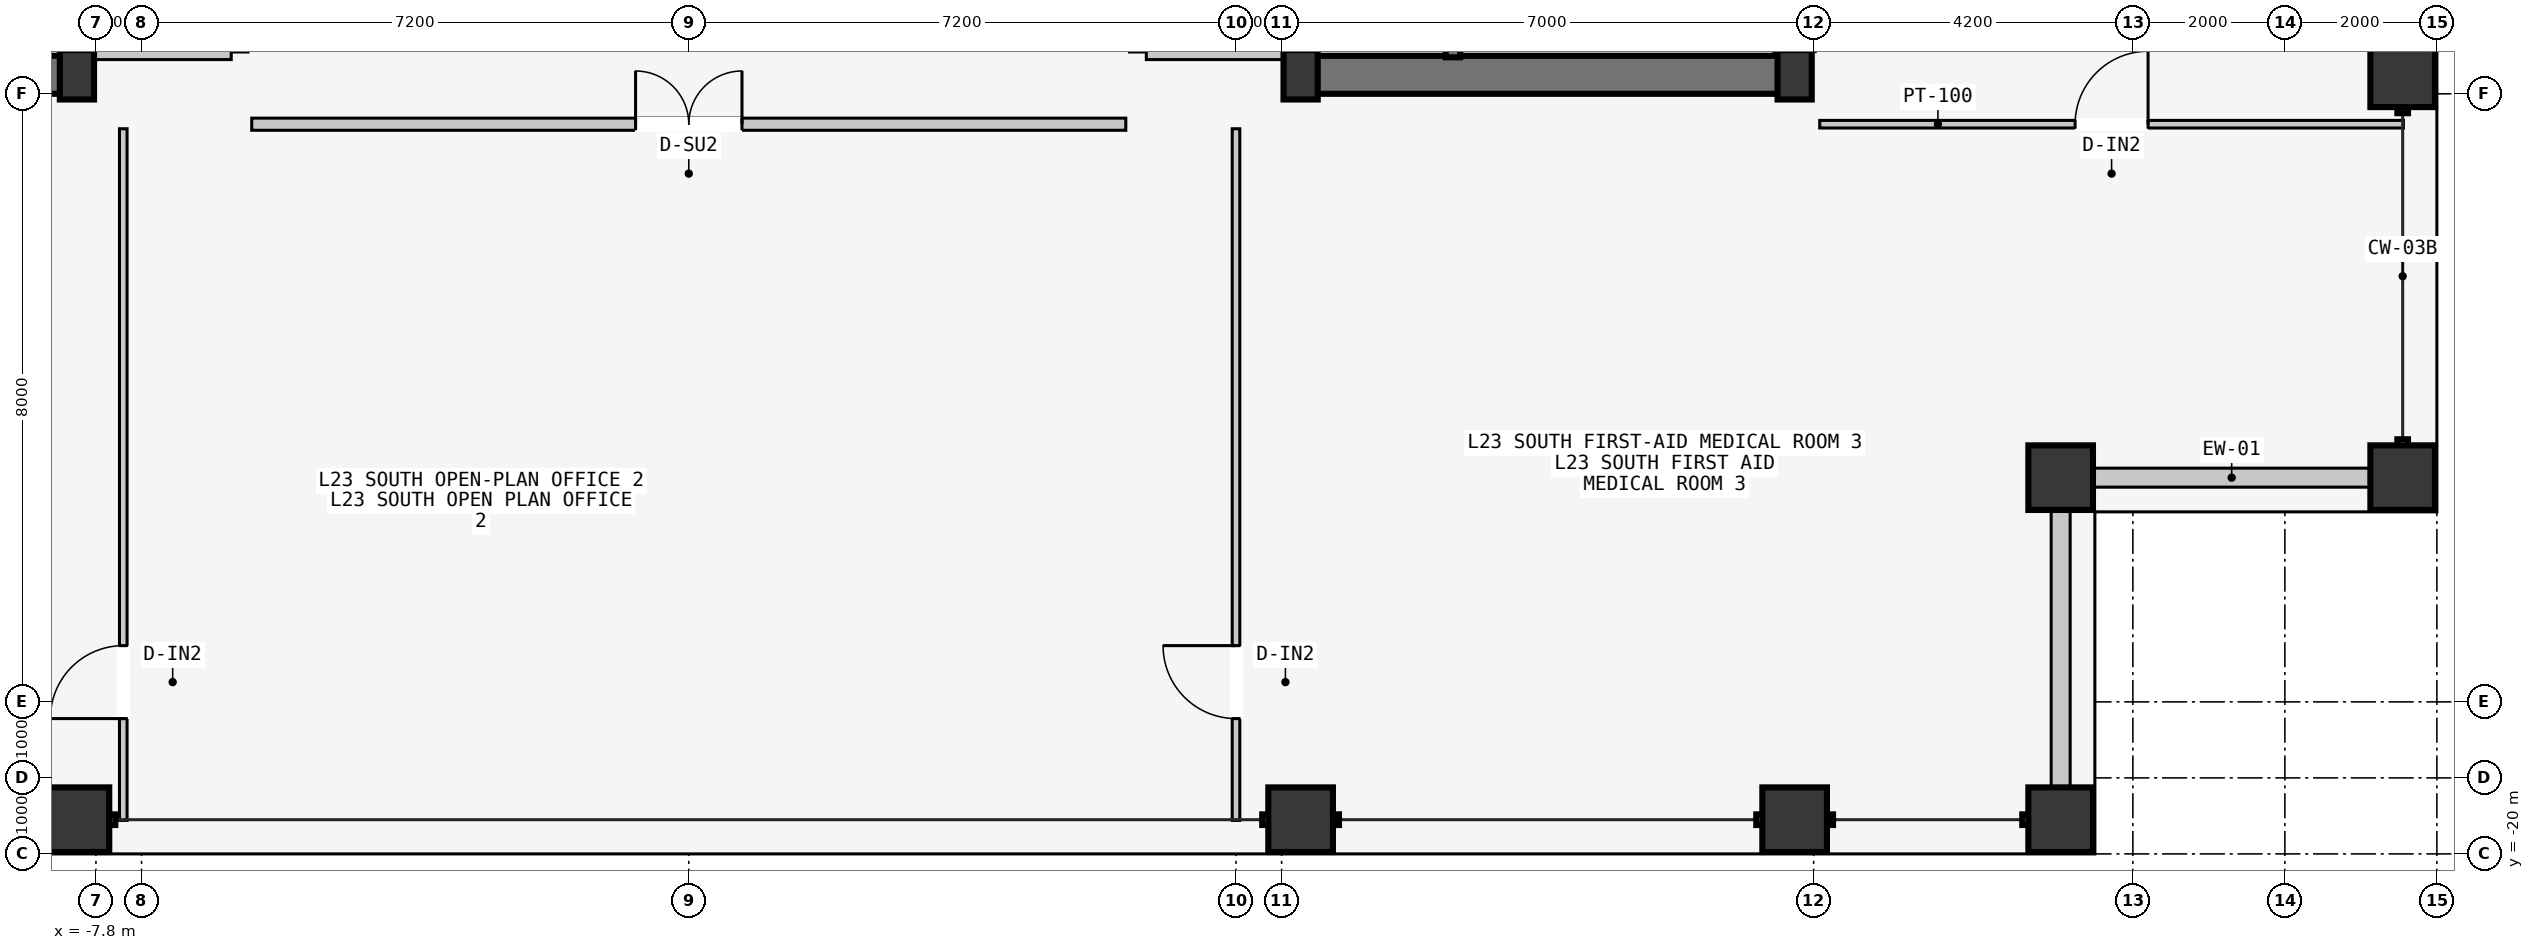
"""IFC4 building model, lengths in metres.
Left out: names, types, materials, properties, quantities, classifications, styles, units other than length and angle.
Written with IfcOpenShell. Run it as: python <this file> out.ifc"""

import sys

from ifc_helpers import new_model, si_unit, direction, frame, frame_2d, origin, origin_2d, place, context, subcontext, project, spatial, rectangle, hollow_rectangle, i_section, extrude, element, fill, save


model = new_model("IFC4")
c1 = context("Model", 3, precision=1e-05, world=origin(), true_north=direction((0.0, 1.0)))
c2 = subcontext(c1, "Body", "Model", "MODEL_VIEW")
j1 = project(units=[si_unit("LENGTHUNIT", "METRE"), si_unit("PLANEANGLEUNIT", "RADIAN")], contexts=[c1])
p1 = place(None, origin())
s1 = spatial("IfcSite", under=j1, at=p1, CompositionType="ELEMENT")
p2 = place(p1, origin())
s2 = spatial("IfcBuilding", under=s1, at=p2, CompositionType="ELEMENT")
p3 = place(p2, frame((0.0, 0.0, 91.8)))
s3 = spatial("IfcBuildingStorey", under=s2, at=p3, CompositionType="ELEMENT", Elevation=91.8)
for number, where, z_axis, x_axis in (
    (1, (-14.53, -9.75, -0.2), (0.0, 0.0, 1.0), (1.0, 0.0, 0.0)),
    (2, (8.07, -9.75, -0.2), (0.0, 0.0, 1.0), (1.0, 0.0, 0.0)),
):
    element("IfcWall", number, at=place(p3, frame(where, z_axis=z_axis, x_axis=x_axis)), inside=s3, PredefinedType="SHEAR", context=c2, shape_type="SweptSolid", body=[
        extrude(rectangle(XDim=6.46, YDim=0.5, at=frame_2d((3.23, 0.0))), origin(), (0.0, 0.0, 1.0), 3.6),
    ])
for number, where, z_axis, x_axis in (
    (3, (-8.05, -9.75, 0.0), (0.0, 0.0, 1.0), (1.0, 0.0, 0.0)),
    (4, (8.05, -9.75, 0.0), (0.0, 0.0, 1.0), (1.0, 0.0, 0.0)),
    (5, (14.55, -9.75, 0.0), (0.0, 0.0, 1.0), (1.0, 0.0, 0.0)),
):
    element("IfcColumn", number, at=place(p3, frame(where, z_axis=z_axis, x_axis=x_axis)), inside=s3, PredefinedType="COLUMN", context=c2, shape_type="SweptSolid", body=[
        extrude(i_section(OverallWidth=0.45, OverallDepth=0.65, WebThickness=0.025, FlangeThickness=0.04, at=origin_2d()), origin(), (0.0, 0.0, 1.0), 3.6),
    ])
for number, where, z_axis, x_axis in (
    (6, (-8.05, -19.55, 0.0), (0.0, 0.0, 1.0), (1.0, 0.0, 0.0)),
    (7, (8.05, -19.55, 0.0), (0.0, 0.0, 1.0), (1.0, 0.0, 0.0)),
    (8, (14.55, -19.55, 0.0), (0.0, 0.0, 1.0), (1.0, 0.0, 0.0)),
    (9, (18.05, -19.55, 0.0), (0.0, 0.0, 1.0), (1.0, 0.0, 0.0)),
    (10, (22.55, -15.05, 0.0), (0.0, 0.0, 1.0), (0.0, 1.0, 0.0)),
    (11, (22.55, -9.75, 0.0), (0.0, 0.0, 1.0), (0.0, 1.0, 0.0)),
    (12, (18.05, -15.05, 0.0), (0.0, 0.0, 1.0), (1.0, 0.0, 0.0)),
):
    element("IfcColumn", number, at=place(p3, frame(where, z_axis=z_axis, x_axis=x_axis)), inside=s3, PredefinedType="COLUMN", context=c2, shape_type="SweptSolid", body=[
        extrude(hollow_rectangle(XDim=0.85, YDim=0.85, WallThickness=0.04, at=origin_2d()), origin(), (0.0, 0.0, 1.0), 3.6),
    ])
for number, where, z_axis, x_axis in (
    (13, (18.485, -15.05, 0.0), (0.0, 0.0, 1.0), (1.0, 0.0, 0.0)),
    (14, (18.05, -19.115, 0.0), (0.0, 0.0, 1.0), (0.0, 1.0, 0.0)),
):
    element("IfcWall", number, at=place(p3, frame(where, z_axis=z_axis, x_axis=x_axis)), inside=s3, PredefinedType="STANDARD", context=c2, shape_type="SweptSolid", body=[
        extrude(rectangle(XDim=3.63, YDim=0.25, at=frame_2d((1.815, 0.0))), origin(), (0.0, 0.0, 1.0), 1.74),
    ])
for number, where, z_axis, x_axis in (
    (15, (-8.045, -9.52, -0.2), (0.0, 0.0, 1.0), (0.0, 1.0, 0.0)),
    (16, (8.045, -9.52, -0.2), (0.0, 0.0, 1.0), (0.0, 1.0, 0.0)),
    (17, (10.055, -9.52, -0.2), (0.0, 0.0, 1.0), (0.0, 1.0, 0.0)),
):
    element("IfcWall", number, at=place(p3, frame(where, z_axis=z_axis, x_axis=x_axis)), inside=s3, PredefinedType="SOLIDWALL", context=c2, shape_type="SweptSolid", body=[
        extrude(rectangle(XDim=2.12, YDim=0.19, at=frame_2d((1.06, 0.0))), origin(), (0.0, 0.0, 1.0), 3.6),
    ])
for number, where, z_axis, x_axis in (
    (18, (-6.02, -9.45, 0.0), (0.0, 0.0, 1.0), (-1.0, 0.0, 0.0)),
    (19, (6.02, -9.45, 0.0), (0.0, 0.0, 1.0), (1.0, 0.0, 0.0)),
):
    element("IfcWall", number, at=place(p3, frame(where, z_axis=z_axis, x_axis=x_axis)), inside=s3, PredefinedType="PARTITIONING", context=c2, shape_type="SweptSolid", body=[
        extrude(rectangle(XDim=1.8, YDim=0.2, at=frame_2d((0.9, 0.0))), origin(), (0.0, 0.0, 1.0), 3.4),
    ])
p4 = place(p3, frame((-7.44, -19.56, 0.0), z_axis=(0.0, 0.0, 1.0), x_axis=(0.0, 1.0, 0.0)))
e20 = element("IfcWall", 20, at=p4, inside=s3, PredefinedType="PARTITIONING", context=c2, shape_type="SweptSolid", body=[
    extrude(rectangle(XDim=9.1, YDim=0.1, at=frame_2d((4.55, 0.0))), origin(), (0.0, 0.0, 1.0), 3.4),
])
p5 = place(p4, frame((1.34, 0.0, 0.0)))
e21 = element("IfcOpeningElement", 21, at=p5, cuts=e20, PredefinedType="OPENING", context=c2, shape_type="SweptSolid", body=[
    extrude(rectangle(XDim=0.96, YDim=2.18, at=frame_2d((0.48, 1.09))), frame((0.0, 0.06, 0.0), z_axis=(0.0, -1.0, 0.0), x_axis=(1.0, 0.0, 0.0)), (0.0, 0.0, 1.0), 0.12),
])
p6 = place(p3, frame((7.2, -19.56, 0.0), z_axis=(0.0, 0.0, 1.0), x_axis=(0.0, 1.0, 0.0)))
e22 = element("IfcWall", 22, at=p6, inside=s3, PredefinedType="PARTITIONING", context=c2, shape_type="SweptSolid", body=[
    extrude(rectangle(XDim=9.1, YDim=0.1, at=frame_2d((4.55, 0.0))), origin(), (0.0, 0.0, 1.0), 3.4),
])
p7 = place(p6, frame((1.34, 0.0, 0.0)))
e23 = element("IfcOpeningElement", 23, at=p7, cuts=e22, PredefinedType="OPENING", context=c2, shape_type="SweptSolid", body=[
    extrude(rectangle(XDim=0.96, YDim=2.18, at=frame_2d((0.48, 1.09))), frame((0.0, 0.06, 0.0), z_axis=(0.0, -1.0, 0.0), x_axis=(1.0, 0.0, 0.0)), (0.0, 0.0, 1.0), 0.12),
])
p8 = place(p3, frame((-5.75, -10.4, 0.0), z_axis=(0.0, 0.0, 1.0), x_axis=(1.0, 0.0, 0.0)))
e24 = element("IfcWall", 24, at=p8, inside=s3, PredefinedType="PARTITIONING", context=c2, shape_type="SweptSolid", body=[
    extrude(rectangle(XDim=11.5, YDim=0.16, at=frame_2d((5.75, 0.0))), origin(), (0.0, 0.0, 1.0), 3.4),
])
p9 = place(p8, frame((5.05, 0.0, 0.0)))
e25 = element("IfcOpeningElement", 25, at=p9, cuts=e24, PredefinedType="OPENING", context=c2, shape_type="SweptSolid", body=[
    extrude(rectangle(XDim=1.4, YDim=2.2, at=frame_2d((0.7, 1.1))), frame((0.0, 0.09, 0.0), z_axis=(0.0, -1.0, 0.0), x_axis=(1.0, 0.0, 0.0)), (0.0, 0.0, 1.0), 0.18),
])
p10 = place(p3, frame((14.88, -10.4, 0.0), z_axis=(0.0, 0.0, 1.0), x_axis=(1.0, 0.0, 0.0)))
e26 = element("IfcWall", 26, at=p10, inside=s3, PredefinedType="PARTITIONING", context=c2, shape_type="SweptSolid", body=[
    extrude(rectangle(XDim=7.68, YDim=0.1, at=frame_2d((3.84, 0.0))), origin(), (0.0, 0.0, 1.0), 3.4),
])
p11 = place(p10, frame((3.36, 0.0, 0.0)))
e27 = element("IfcOpeningElement", 27, at=p11, cuts=e26, PredefinedType="OPENING", context=c2, shape_type="SweptSolid", body=[
    extrude(rectangle(XDim=0.96, YDim=2.18, at=frame_2d((0.48, 1.09))), frame((0.0, 0.06, 0.0), z_axis=(0.0, -1.0, 0.0), x_axis=(1.0, 0.0, 0.0)), (0.0, 0.0, 1.0), 0.12),
])
p12 = place(p5, origin())
e28 = element("IfcDoor", 28, at=p12, inside=s3, OperationType="SINGLE_SWING_LEFT", PredefinedType="DOOR", context=c2, shape_type="SweptSolid", body=[
    extrude(rectangle(XDim=0.96, YDim=2.18, at=frame_2d((0.48, 1.09))), frame((0.0, 0.025, 0.0), z_axis=(0.0, -1.0, 0.0), x_axis=(1.0, 0.0, 0.0)), (0.0, 0.0, 1.0), 0.05),
])
fill(e21, e28)
p13 = place(p7, origin())
e29 = element("IfcDoor", 29, at=p13, inside=s3, OperationType="SINGLE_SWING_RIGHT", PredefinedType="DOOR", context=c2, shape_type="SweptSolid", body=[
    extrude(rectangle(XDim=0.96, YDim=2.18, at=frame_2d((0.48, 1.09))), frame((0.0, 0.025, 0.0), z_axis=(0.0, -1.0, 0.0), x_axis=(1.0, 0.0, 0.0)), (0.0, 0.0, 1.0), 0.05),
])
fill(e23, e29)
p14 = place(p9, origin())
e30 = element("IfcDoor", 30, at=p14, inside=s3, OperationType="DOUBLE_DOOR_SINGLE_SWING", PredefinedType="DOOR", context=c2, shape_type="SweptSolid", body=[
    extrude(rectangle(XDim=1.4, YDim=2.2, at=frame_2d((0.7, 1.1))), frame((0.0, 0.025, 0.0), z_axis=(0.0, -1.0, 0.0), x_axis=(1.0, 0.0, 0.0)), (0.0, 0.0, 1.0), 0.05),
])
fill(e25, e30)
p15 = place(p11, origin())
e31 = element("IfcDoor", 31, at=p15, inside=s3, OperationType="SINGLE_SWING_RIGHT", PredefinedType="DOOR", context=c2, shape_type="SweptSolid", body=[
    extrude(rectangle(XDim=0.96, YDim=2.18, at=frame_2d((0.48, 1.09))), frame((0.0, 0.025, 0.0), z_axis=(0.0, -1.0, 0.0), x_axis=(1.0, 0.0, 0.0)), (0.0, 0.0, 1.0), 0.05),
])
fill(e27, e31)
save(model, sys.argv[1])
